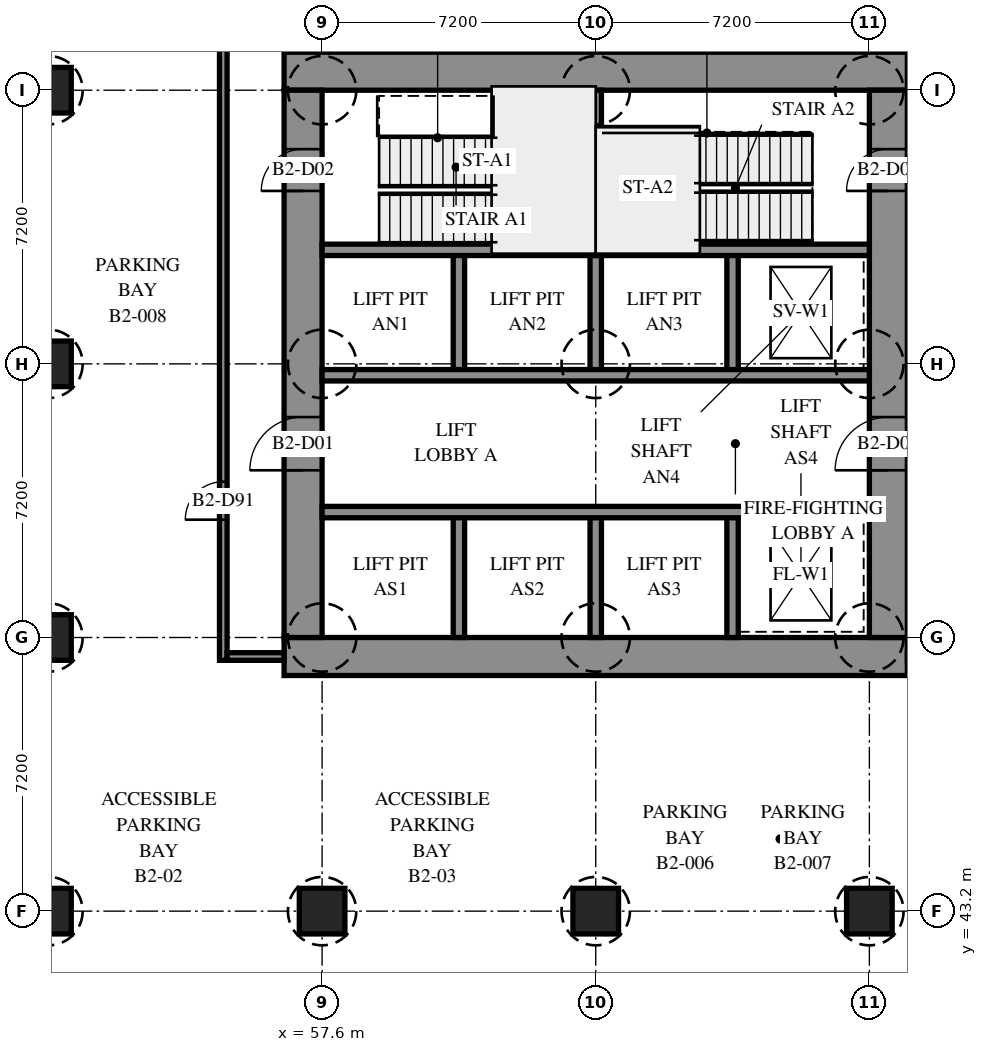
"""IFC4 building model, lengths in metres.
Left out: names, types, materials, properties, quantities, classifications, styles, units other than length and angle.
Written with IfcOpenShell. Run it as: python <this file> out.ifc"""

import sys

from ifc_helpers import new_model, si_unit, direction, frame, frame_2d, origin, origin_2d, place, context, subcontext, project, spatial, rectangle, extrude, element, fill, save


model = new_model("IFC4")
c1 = context("Model", 3, precision=1e-05, world=origin(), true_north=direction((0.0, 1.0)))
c2 = subcontext(c1, "Body", "Model", "MODEL_VIEW")
j1 = project(units=[si_unit("LENGTHUNIT", "METRE"), si_unit("PLANEANGLEUNIT", "RADIAN")], contexts=[c1])
p1 = place(None, origin())
s1 = spatial("IfcSite", under=j1, at=p1, CompositionType="ELEMENT")
p2 = place(p1, origin())
s2 = spatial("IfcBuilding", under=s1, at=p2, CompositionType="ELEMENT")
p3 = place(p2, frame((0.0, 0.0, -9.0)))
s3 = spatial("IfcBuildingStorey", under=s2, at=p3, CompositionType="ELEMENT", Elevation=-9.0)
for number, where, z_axis, x_axis in (
    (1, (50.4, 43.2, 0.0), (0.0, 0.0, 1.0), (1.0, 0.0, 0.0)),
    (2, (50.4, 50.4, 0.0), (0.0, 0.0, 1.0), (1.0, 0.0, 0.0)),
    (3, (50.4, 57.6, 0.0), (0.0, 0.0, 1.0), (1.0, 0.0, 0.0)),
    (4, (50.4, 64.8, 0.0), (0.0, 0.0, 1.0), (1.0, 0.0, 0.0)),
    (5, (57.6, 43.2, 0.0), (0.0, 0.0, 1.0), (1.0, 0.0, 0.0)),
    (6, (64.8, 43.2, 0.0), (0.0, 0.0, 1.0), (1.0, 0.0, 0.0)),
    (7, (72.0, 43.2, 0.0), (0.0, 0.0, 1.0), (1.0, 0.0, 0.0)),
):
    element("IfcColumn", number, at=place(p3, frame(where, z_axis=z_axis, x_axis=x_axis)), inside=s3, PredefinedType="COLUMN", context=c2, shape_type="SweptSolid", body=[
        extrude(rectangle(XDim=1.2, YDim=1.2, at=origin_2d()), origin(), (0.0, 0.0, 1.0), 4.2),
    ])
for number, where, z_axis, x_axis in (
    (8, (56.6, 49.9, -0.3), (0.0, 0.0, 1.0), (1.0, 0.0, 0.0)),
    (9, (56.6, 65.3, -0.3), (0.0, 0.0, 1.0), (1.0, 0.0, 0.0)),
):
    element("IfcWall", number, at=place(p3, frame(where, z_axis=z_axis, x_axis=x_axis)), inside=s3, PredefinedType="SHEAR", context=c2, shape_type="SweptSolid", body=[
        extrude(rectangle(XDim=16.4, YDim=1.0, at=frame_2d((8.2, 0.0))), origin(), (0.0, 0.0, 1.0), 3.8),
    ])
p4 = place(p3, frame((57.1, 50.4, -0.3), z_axis=(0.0, 0.0, 1.0), x_axis=(0.0, 1.0, 0.0)))
e10 = element("IfcWall", 10, at=p4, inside=s3, PredefinedType="SHEAR", context=c2, shape_type="SweptSolid", body=[
    extrude(rectangle(XDim=14.4, YDim=1.0, at=frame_2d((7.2, 0.0))), origin(), (0.0, 0.0, 1.0), 3.8),
])
p5 = place(p4, frame((4.4, 0.0, 0.3)))
e11 = element("IfcOpeningElement", 11, at=p5, cuts=e10, PredefinedType="OPENING", context=c2, shape_type="SweptSolid", body=[
    extrude(rectangle(XDim=1.4, YDim=2.1, at=frame_2d((0.7, 1.05))), frame((0.0, 0.51, 0.0), z_axis=(0.0, -1.0, 0.0), x_axis=(1.0, 0.0, 0.0)), (0.0, 0.0, 1.0), 1.02),
])
p6 = place(p4, frame((11.75, 0.0, 0.3)))
e12 = element("IfcOpeningElement", 12, at=p6, cuts=e10, PredefinedType="OPENING", context=c2, shape_type="SweptSolid", body=[
    extrude(rectangle(XDim=1.1, YDim=2.1, at=frame_2d((0.55, 1.05))), frame((0.0, 0.51, 0.0), z_axis=(0.0, -1.0, 0.0), x_axis=(1.0, 0.0, 0.0)), (0.0, 0.0, 1.0), 1.02),
])
p7 = place(p3, frame((72.5, 50.4, -0.3), z_axis=(0.0, 0.0, 1.0), x_axis=(0.0, 1.0, 0.0)))
e13 = element("IfcWall", 13, at=p7, inside=s3, PredefinedType="SHEAR", context=c2, shape_type="SweptSolid", body=[
    extrude(rectangle(XDim=14.4, YDim=1.0, at=frame_2d((7.2, 0.0))), origin(), (0.0, 0.0, 1.0), 3.8),
])
p8 = place(p7, frame((4.4, 0.0, 0.3)))
e14 = element("IfcOpeningElement", 14, at=p8, cuts=e13, PredefinedType="OPENING", context=c2, shape_type="SweptSolid", body=[
    extrude(rectangle(XDim=1.4, YDim=2.1, at=frame_2d((0.7, 1.05))), frame((0.0, 0.51, 0.0), z_axis=(0.0, -1.0, 0.0), x_axis=(1.0, 0.0, 0.0)), (0.0, 0.0, 1.0), 1.02),
])
p9 = place(p7, frame((11.75, 0.0, 0.3)))
e15 = element("IfcOpeningElement", 15, at=p9, cuts=e13, PredefinedType="OPENING", context=c2, shape_type="SweptSolid", body=[
    extrude(rectangle(XDim=1.1, YDim=2.1, at=frame_2d((0.55, 1.05))), frame((0.0, 0.51, 0.0), z_axis=(0.0, -1.0, 0.0), x_axis=(1.0, 0.0, 0.0)), (0.0, 0.0, 1.0), 1.02),
])
for number, where, z_axis, x_axis in (
    (16, (61.2, 50.4, 0.0), (0.0, 0.0, 1.0), (0.0, 1.0, 0.0)),
    (17, (61.2, 57.3, 0.0), (0.0, 0.0, 1.0), (0.0, 1.0, 0.0)),
    (18, (64.8, 50.4, 0.0), (0.0, 0.0, 1.0), (0.0, 1.0, 0.0)),
    (19, (64.8, 57.3, 0.0), (0.0, 0.0, 1.0), (0.0, 1.0, 0.0)),
    (20, (68.4, 50.4, 0.0), (0.0, 0.0, 1.0), (0.0, 1.0, 0.0)),
    (21, (68.4, 57.3, 0.0), (0.0, 0.0, 1.0), (0.0, 1.0, 0.0)),
):
    element("IfcWall", number, at=place(p3, frame(where, z_axis=z_axis, x_axis=x_axis)), inside=s3, PredefinedType="SOLIDWALL", context=c2, shape_type="SweptSolid", body=[
        extrude(rectangle(XDim=3.3, YDim=0.3, at=frame_2d((1.65, 0.0))), origin(), (0.0, 0.0, 1.0), 4.2),
    ])
for number, where, z_axis, x_axis in (
    (22, (57.6, 53.7, 0.0), (0.0, 0.0, 1.0), (1.0, 0.0, 0.0)),
    (23, (57.6, 57.3, 0.0), (0.0, 0.0, 1.0), (1.0, 0.0, 0.0)),
):
    element("IfcWall", number, at=place(p3, frame(where, z_axis=z_axis, x_axis=x_axis)), inside=s3, PredefinedType="SOLIDWALL", context=c2, shape_type="SweptSolid", body=[
        extrude(rectangle(XDim=14.4, YDim=0.3, at=frame_2d((7.2, 0.0))), origin(), (0.0, 0.0, 1.0), 4.2),
    ])
for number, where, z_axis, x_axis in (
    (24, (57.6, 60.6, 0.0), (0.0, 0.0, 1.0), (1.0, 0.0, 0.0)),
    (25, (64.8, 60.6, 0.0), (0.0, 0.0, 1.0), (1.0, 0.0, 0.0)),
):
    element("IfcWall", number, at=place(p3, frame(where, z_axis=z_axis, x_axis=x_axis)), inside=s3, PredefinedType="SOLIDWALL", context=c2, shape_type="SweptSolid", body=[
        extrude(rectangle(XDim=7.2, YDim=0.3, at=frame_2d((3.6, 0.0))), origin(), (0.0, 0.0, 1.0), 4.2),
    ])
p10 = place(p3, frame((64.8, 60.6, 0.0), z_axis=(0.0, 0.0, 1.0), x_axis=(0.0, 1.0, 0.0)))
e26 = element("IfcWall", 26, at=p10, inside=s3, PredefinedType="SOLIDWALL", context=c2, shape_type="SweptSolid", body=[
    extrude(rectangle(XDim=4.2, YDim=0.3, at=frame_2d((2.1, 0.0))), origin(), (0.0, 0.0, 1.0), 4.2),
])
p11 = place(p3, frame((55.0, 49.8, 0.0), z_axis=(0.0, 0.0, 1.0), x_axis=(0.0, 1.0, 0.0)))
e27 = element("IfcWall", 27, at=p11, inside=s3, PredefinedType="PARTITIONING", context=c2, shape_type="SweptSolid", body=[
    extrude(rectangle(XDim=17.7, YDim=0.2, at=frame_2d((8.85, 0.0))), origin(), (0.0, 0.0, 1.0), 4.2),
])
p12 = place(p11, frame((16.2, 0.0, 0.0)))
e28 = element("IfcOpeningElement", 28, at=p12, cuts=e27, PredefinedType="OPENING", context=c2, shape_type="SweptSolid", body=[
    extrude(rectangle(XDim=1.0, YDim=2.1, at=frame_2d((0.5, 1.05))), frame((0.0, 0.11, 0.0), z_axis=(0.0, -1.0, 0.0), x_axis=(1.0, 0.0, 0.0)), (0.0, 0.0, 1.0), 0.22),
])
p13 = place(p11, frame((3.7, 0.0, 0.0)))
e29 = element("IfcOpeningElement", 29, at=p13, cuts=e27, PredefinedType="OPENING", context=c2, shape_type="SweptSolid", body=[
    extrude(rectangle(XDim=1.0, YDim=2.1, at=frame_2d((0.5, 1.05))), frame((0.0, 0.11, 0.0), z_axis=(0.0, -1.0, 0.0), x_axis=(1.0, 0.0, 0.0)), (0.0, 0.0, 1.0), 0.22),
])
p14 = place(p3, frame((55.1, 49.9, 0.0), z_axis=(0.0, 0.0, 1.0), x_axis=(1.0, 0.0, 0.0)))
e30 = element("IfcWall", 30, at=p14, inside=s3, PredefinedType="PARTITIONING", context=c2, shape_type="SweptSolid", body=[
    extrude(rectangle(XDim=1.5, YDim=0.2, at=frame_2d((0.75, 0.0))), origin(), (0.0, 0.0, 1.0), 4.2),
])
p15 = place(p13, origin())
e31 = element("IfcDoor", 31, at=p15, inside=s3, OperationType="SINGLE_SWING_RIGHT", PredefinedType="DOOR", context=c2, shape_type="SweptSolid", body=[
    extrude(rectangle(XDim=1.0, YDim=2.1, at=frame_2d((0.5, 1.05))), frame((0.0, 0.025, 0.0), z_axis=(0.0, -1.0, 0.0), x_axis=(1.0, 0.0, 0.0)), (0.0, 0.0, 1.0), 0.05),
])
fill(e29, e31)
p16 = place(p5, origin())
e32 = element("IfcDoor", 32, at=p16, inside=s3, OperationType="SINGLE_SWING_RIGHT", PredefinedType="DOOR", context=c2, shape_type="SweptSolid", body=[
    extrude(rectangle(XDim=1.4, YDim=2.1, at=frame_2d((0.7, 1.05))), frame((0.0, 0.025, 0.0), z_axis=(0.0, -1.0, 0.0), x_axis=(1.0, 0.0, 0.0)), (0.0, 0.0, 1.0), 0.05),
])
fill(e11, e32)
p17 = place(p6, origin())
e33 = element("IfcDoor", 33, at=p17, inside=s3, OperationType="SINGLE_SWING_LEFT", PredefinedType="DOOR", context=c2, shape_type="SweptSolid", body=[
    extrude(rectangle(XDim=1.1, YDim=2.1, at=frame_2d((0.55, 1.05))), frame((0.0, 0.025, 0.0), z_axis=(0.0, -1.0, 0.0), x_axis=(1.0, 0.0, 0.0)), (0.0, 0.0, 1.0), 0.05),
])
fill(e12, e33)
p18 = place(p8, origin())
e34 = element("IfcDoor", 34, at=p18, inside=s3, OperationType="SINGLE_SWING_RIGHT", PredefinedType="DOOR", context=c2, shape_type="SweptSolid", body=[
    extrude(rectangle(XDim=1.4, YDim=2.1, at=frame_2d((0.7, 1.05))), frame((0.0, 0.025, 0.0), z_axis=(0.0, -1.0, 0.0), x_axis=(1.0, 0.0, 0.0)), (0.0, 0.0, 1.0), 0.05),
])
fill(e14, e34)
p19 = place(p9, origin())
e35 = element("IfcDoor", 35, at=p19, inside=s3, OperationType="SINGLE_SWING_LEFT", PredefinedType="DOOR", context=c2, shape_type="SweptSolid", body=[
    extrude(rectangle(XDim=1.1, YDim=2.1, at=frame_2d((0.55, 1.05))), frame((0.0, 0.025, 0.0), z_axis=(0.0, -1.0, 0.0), x_axis=(1.0, 0.0, 0.0)), (0.0, 0.0, 1.0), 0.05),
])
fill(e15, e35)
save(model, sys.argv[1])
